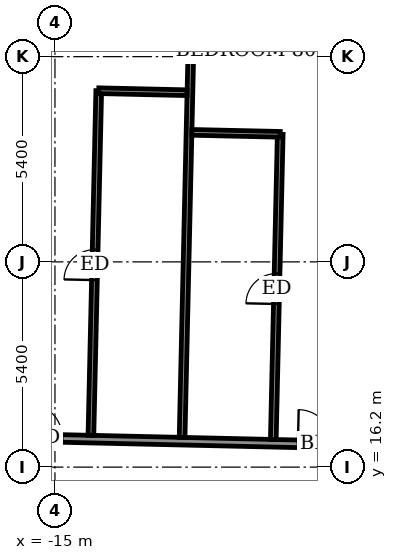
"""IFC4 building model, lengths in metres.
Left out: names, types, materials, properties, quantities, classifications, styles, units other than length and angle.
Written with IfcOpenShell. Run it as: python <this file> out.ifc"""

import sys

from ifc_helpers import new_model, si_unit, direction, frame, frame_2d, origin, place, context, subcontext, project, spatial, rectangle, extrude, element, fill, save


model = new_model("IFC4")
c1 = context("Model", 3, precision=1e-05, world=origin(), true_north=direction((0.0, 1.0)))
c2 = subcontext(c1, "Body", "Model", "MODEL_VIEW")
j1 = project(units=[si_unit("LENGTHUNIT", "METRE"), si_unit("PLANEANGLEUNIT", "RADIAN")], contexts=[c1])
p1 = place(None, origin())
s1 = spatial("IfcSite", under=j1, at=p1, CompositionType="ELEMENT")
p2 = place(p1, origin())
s2 = spatial("IfcBuilding", under=s1, at=p2, CompositionType="ELEMENT")
p3 = place(p2, frame((0.0, 0.0, 313.3)))
s3 = spatial("IfcBuildingStorey", under=s2, at=p3, CompositionType="ELEMENT", Elevation=313.3)
p4 = place(p3, frame((-30.652, 17.313, 0.0), z_axis=(0.0, 0.0, 1.0), x_axis=(0.999742623764, -0.02268669719, 0.0)))
e1 = element("IfcWall", 1, at=p4, inside=s3, PredefinedType="PARTITIONING", context=c2, shape_type="SweptSolid", body=[
    extrude(rectangle(XDim=58.8, YDim=0.2, at=frame_2d((29.4, 0.0))), origin(), (0.0, 0.0, 1.0), 3.05),
])
p5 = place(p4, frame((54.601, 0.0, 0.0)))
e2 = element("IfcOpeningElement", 2, at=p5, cuts=e1, PredefinedType="OPENING", context=c2, shape_type="SweptSolid", body=[
    extrude(rectangle(XDim=1.0, YDim=2.1, at=frame_2d((0.5, 1.05))), frame((0.0, 0.11, 0.0), z_axis=(0.0, -1.0, 0.0), x_axis=(1.0, 0.0, 0.0)), (0.0, 0.0, 1.0), 0.22),
])
p6 = place(p4, frame((49.35, 0.0, 0.0)))
e3 = element("IfcOpeningElement", 3, at=p6, cuts=e1, PredefinedType="OPENING", context=c2, shape_type="SweptSolid", body=[
    extrude(rectangle(XDim=0.9, YDim=2.1, at=frame_2d((0.45, 1.05))), frame((0.0, 0.11, 0.0), z_axis=(0.0, -1.0, 0.0), x_axis=(1.0, 0.0, 0.0)), (0.0, 0.0, 1.0), 0.22),
])
p7 = place(p4, frame((42.55, 0.0, 0.0)))
e4 = element("IfcOpeningElement", 4, at=p7, cuts=e1, PredefinedType="OPENING", context=c2, shape_type="SweptSolid", body=[
    extrude(rectangle(XDim=0.9, YDim=2.1, at=frame_2d((0.45, 1.05))), frame((0.0, 0.11, 0.0), z_axis=(0.0, -1.0, 0.0), x_axis=(1.0, 0.0, 0.0)), (0.0, 0.0, 1.0), 0.22),
])
p8 = place(p4, frame((40.475, 0.0, 0.0)))
e5 = element("IfcOpeningElement", 5, at=p8, cuts=e1, PredefinedType="OPENING", context=c2, shape_type="SweptSolid", body=[
    extrude(rectangle(XDim=0.9, YDim=2.1, at=frame_2d((0.45, 1.05))), frame((0.0, 0.11, 0.0), z_axis=(0.0, -1.0, 0.0), x_axis=(1.0, 0.0, 0.0)), (0.0, 0.0, 1.0), 0.22),
])
p9 = place(p4, frame((33.6, 0.0, 0.0)))
e6 = element("IfcOpeningElement", 6, at=p9, cuts=e1, PredefinedType="OPENING", context=c2, shape_type="SweptSolid", body=[
    extrude(rectangle(XDim=0.9, YDim=2.1, at=frame_2d((0.45, 1.05))), frame((0.0, 0.11, 0.0), z_axis=(0.0, -1.0, 0.0), x_axis=(1.0, 0.0, 0.0)), (0.0, 0.0, 1.0), 0.22),
])
p10 = place(p4, frame((31.55, 0.0, 0.0)))
e7 = element("IfcOpeningElement", 7, at=p10, cuts=e1, PredefinedType="OPENING", context=c2, shape_type="SweptSolid", body=[
    extrude(rectangle(XDim=0.9, YDim=2.1, at=frame_2d((0.45, 1.05))), frame((0.0, 0.11, 0.0), z_axis=(0.0, -1.0, 0.0), x_axis=(1.0, 0.0, 0.0)), (0.0, 0.0, 1.0), 0.22),
])
p11 = place(p4, frame((24.425, 0.0, 0.0)))
e8 = element("IfcOpeningElement", 8, at=p11, cuts=e1, PredefinedType="OPENING", context=c2, shape_type="SweptSolid", body=[
    extrude(rectangle(XDim=0.9, YDim=2.1, at=frame_2d((0.45, 1.05))), frame((0.0, 0.11, 0.0), z_axis=(0.0, -1.0, 0.0), x_axis=(1.0, 0.0, 0.0)), (0.0, 0.0, 1.0), 0.22),
])
p12 = place(p4, frame((22.05, 0.0, 0.0)))
e9 = element("IfcOpeningElement", 9, at=p12, cuts=e1, PredefinedType="OPENING", context=c2, shape_type="SweptSolid", body=[
    extrude(rectangle(XDim=0.9, YDim=2.1, at=frame_2d((0.45, 1.05))), frame((0.0, 0.11, 0.0), z_axis=(0.0, -1.0, 0.0), x_axis=(1.0, 0.0, 0.0)), (0.0, 0.0, 1.0), 0.22),
])
p13 = place(p4, frame((14.95, 0.0, 0.0)))
e10 = element("IfcOpeningElement", 10, at=p13, cuts=e1, PredefinedType="OPENING", context=c2, shape_type="SweptSolid", body=[
    extrude(rectangle(XDim=0.9, YDim=2.1, at=frame_2d((0.45, 1.05))), frame((0.0, 0.11, 0.0), z_axis=(0.0, -1.0, 0.0), x_axis=(1.0, 0.0, 0.0)), (0.0, 0.0, 1.0), 0.22),
])
p14 = place(p4, frame((12.525, 0.0, 0.0)))
e11 = element("IfcOpeningElement", 11, at=p14, cuts=e1, PredefinedType="OPENING", context=c2, shape_type="SweptSolid", body=[
    extrude(rectangle(XDim=0.9, YDim=2.1, at=frame_2d((0.45, 1.05))), frame((0.0, 0.11, 0.0), z_axis=(0.0, -1.0, 0.0), x_axis=(1.0, 0.0, 0.0)), (0.0, 0.0, 1.0), 0.22),
])
p15 = place(p4, frame((4.032, 0.0, 0.0)))
e12 = element("IfcOpeningElement", 12, at=p15, cuts=e1, PredefinedType="OPENING", context=c2, shape_type="SweptSolid", body=[
    extrude(rectangle(XDim=1.0, YDim=2.1, at=frame_2d((0.5, 1.05))), frame((0.0, 0.11, 0.0), z_axis=(0.0, -1.0, 0.0), x_axis=(1.0, 0.0, 0.0)), (0.0, 0.0, 1.0), 0.22),
])
p16 = place(p3, frame((-14.054, 17.037, 0.0), z_axis=(0.0, 0.0, 1.0), x_axis=(0.022720182365, 0.999741863339, 0.0)))
e13 = element("IfcWall", 13, at=p16, inside=s3, PredefinedType="PARTITIONING", context=c2, shape_type="SweptSolid", body=[
    extrude(rectangle(XDim=9.069, YDim=0.15, at=frame_2d((4.535, 0.0))), origin(), (0.0, 0.0, 1.0), 3.05),
])
p17 = place(p16, frame((4.085, 0.0, 0.0)))
e14 = element("IfcOpeningElement", 14, at=p17, cuts=e13, PredefinedType="OPENING", context=c2, shape_type="SweptSolid", body=[
    extrude(rectangle(XDim=0.8, YDim=2.1, at=frame_2d((0.4, 1.05))), frame((0.0, 0.085, 0.0), z_axis=(0.0, -1.0, 0.0), x_axis=(1.0, 0.0, 0.0)), (0.0, 0.0, 1.0), 0.17),
])
p18 = place(p3, frame((-11.655, 16.982, 0.0), z_axis=(0.0, 0.0, 1.0), x_axis=(0.022740189192, 0.999741408463, 0.0)))
e15 = element("IfcWall", 15, at=p18, inside=s3, PredefinedType="PARTITIONING", context=c2, shape_type="SweptSolid", body=[
    extrude(rectangle(XDim=12.4, YDim=0.15, at=frame_2d((6.2, 0.0))), origin(), (0.0, 0.0, 1.0), 2.5),
])
p19 = place(p3, frame((-9.255, 16.928, 0.0), z_axis=(0.0, 0.0, 1.0), x_axis=(0.022650271266, 0.999743449697, 0.0)))
e16 = element("IfcWall", 16, at=p19, inside=s3, PredefinedType="PARTITIONING", context=c2, shape_type="SweptSolid", body=[
    extrude(rectangle(XDim=8.03, YDim=0.15, at=frame_2d((4.015, 0.0))), origin(), (0.0, 0.0, 1.0), 3.05),
])
p20 = place(p19, frame((3.565, 0.0, 0.0)))
e17 = element("IfcOpeningElement", 17, at=p20, cuts=e16, PredefinedType="OPENING", context=c2, shape_type="SweptSolid", body=[
    extrude(rectangle(XDim=0.8, YDim=2.1, at=frame_2d((0.4, 1.05))), frame((0.0, 0.085, 0.0), z_axis=(0.0, -1.0, 0.0), x_axis=(1.0, 0.0, 0.0)), (0.0, 0.0, 1.0), 0.17),
])
p21 = place(p3, frame((-11.398, 25.008, 0.0), z_axis=(0.0, 0.0, 1.0), x_axis=(0.999749954681, -0.022361308448, 0.0)))
e18 = element("IfcWall", 18, at=p21, inside=s3, PredefinedType="PARTITIONING", context=c2, shape_type="SweptSolid", body=[
    extrude(rectangle(XDim=2.325, YDim=0.15, at=frame_2d((1.163, 0.0))), origin(), (0.0, 0.0, 1.0), 3.05),
])
p22 = place(p3, frame((-13.848, 26.104, 0.0), z_axis=(0.0, 0.0, 1.0), x_axis=(0.999740260747, -0.02279059109, 0.0)))
e19 = element("IfcWall", 19, at=p22, inside=s3, PredefinedType="PARTITIONING", context=c2, shape_type="SweptSolid", body=[
    extrude(rectangle(XDim=2.324, YDim=0.15, at=frame_2d((1.162, 0.0))), origin(), (0.0, 0.0, 1.0), 3.05),
])
p23 = place(p12, origin())
e20 = element("IfcDoor", 20, at=p23, inside=s3, OperationType="SINGLE_SWING_LEFT", PredefinedType="DOOR", context=c2, shape_type="SweptSolid", body=[
    extrude(rectangle(XDim=0.9, YDim=2.1, at=frame_2d((0.45, 1.05))), frame((0.0, 0.025, 0.0), z_axis=(0.0, -1.0, 0.0), x_axis=(1.0, 0.0, 0.0)), (0.0, 0.0, 1.0), 0.05),
])
fill(e9, e20)
p24 = place(p20, origin())
e21 = element("IfcDoor", 21, at=p24, inside=s3, OperationType="SINGLE_SWING_LEFT", PredefinedType="DOOR", context=c2, shape_type="SweptSolid", body=[
    extrude(rectangle(XDim=0.8, YDim=2.1, at=frame_2d((0.4, 1.05))), frame((0.0, 0.025, 0.0), z_axis=(0.0, -1.0, 0.0), x_axis=(1.0, 0.0, 0.0)), (0.0, 0.0, 1.0), 0.05),
])
fill(e17, e21)
p25 = place(p13, origin())
e22 = element("IfcDoor", 22, at=p25, inside=s3, OperationType="SINGLE_SWING_RIGHT", PredefinedType="DOOR", context=c2, shape_type="SweptSolid", body=[
    extrude(rectangle(XDim=0.9, YDim=2.1, at=frame_2d((0.45, 1.05))), frame((0.0, 0.025, 0.0), z_axis=(0.0, -1.0, 0.0), x_axis=(1.0, 0.0, 0.0)), (0.0, 0.0, 1.0), 0.05),
])
fill(e10, e22)
p26 = place(p17, origin())
e23 = element("IfcDoor", 23, at=p26, inside=s3, OperationType="SINGLE_SWING_RIGHT", PredefinedType="DOOR", context=c2, shape_type="SweptSolid", body=[
    extrude(rectangle(XDim=0.8, YDim=2.1, at=frame_2d((0.4, 1.05))), frame((0.0, 0.025, 0.0), z_axis=(0.0, -1.0, 0.0), x_axis=(1.0, 0.0, 0.0)), (0.0, 0.0, 1.0), 0.05),
])
fill(e14, e23)
save(model, sys.argv[1])
